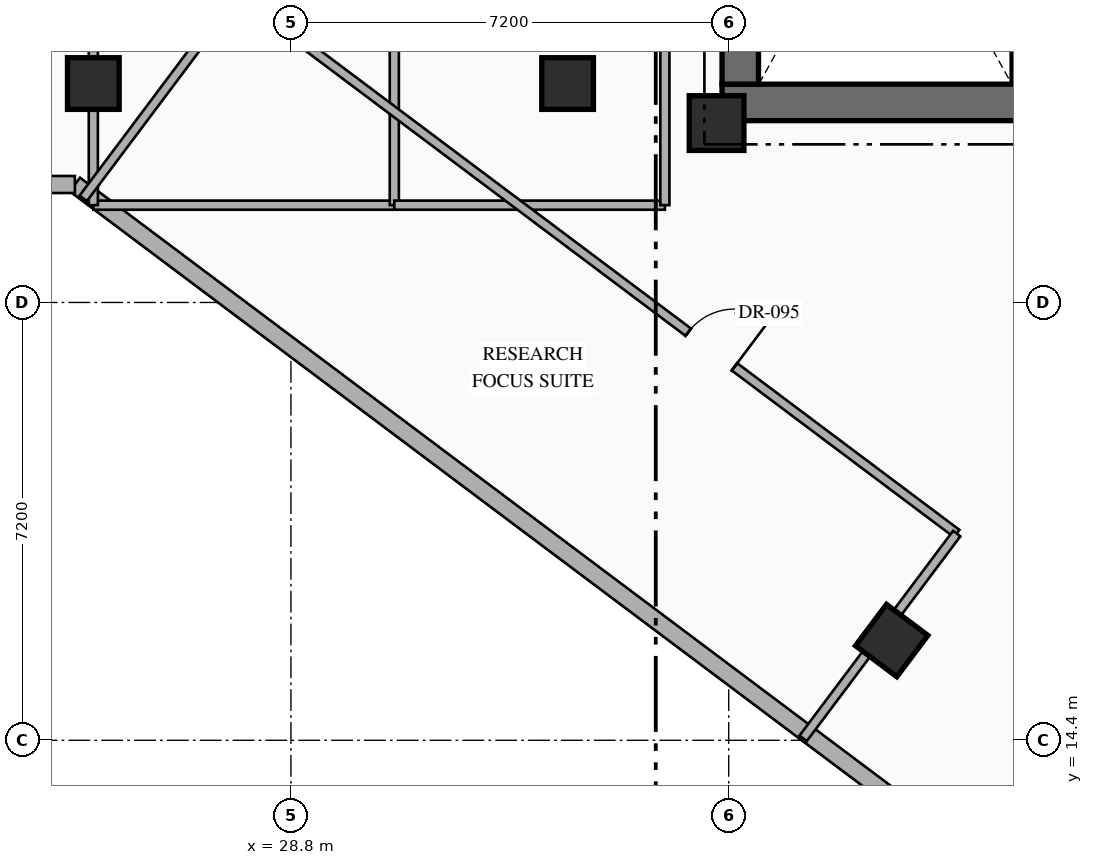
"""IFC4 building model, lengths in metres.
Left out: names, types, materials, properties, quantities, classifications, styles, units other than length and angle.
Written with IfcOpenShell. Run it as: python <this file> out.ifc"""

import sys

from ifc_helpers import new_model, si_unit, direction, frame, frame_2d, origin, origin_2d, place, context, subcontext, project, spatial, rectangle, hollow_rectangle, extrude, element, fill, save


model = new_model("IFC4")
c1 = context("Model", 3, precision=1e-05, world=origin(), true_north=direction((0.0, 1.0)))
c2 = subcontext(c1, "Body", "Model", "MODEL_VIEW")
j1 = project(units=[si_unit("LENGTHUNIT", "METRE"), si_unit("PLANEANGLEUNIT", "RADIAN")], contexts=[c1])
p1 = place(None, origin())
s1 = spatial("IfcSite", under=j1, at=p1, CompositionType="ELEMENT")
p2 = place(p1, origin())
s2 = spatial("IfcBuilding", under=s1, at=p2, CompositionType="ELEMENT")
p3 = place(p2, frame((0.0, 0.0, 138.45)))
s3 = spatial("IfcBuildingStorey", under=s2, at=p3, CompositionType="ELEMENT", Elevation=138.45)
p4 = place(p3, frame((35.89, 24.89, 0.0), z_axis=(0.0, 0.0, 1.0), x_axis=(1.0, 0.0, 0.0)))
e1 = element("IfcWall", 1, at=p4, inside=s3, PredefinedType="SHEAR", context=c2, shape_type="SweptSolid", body=[
    extrude(rectangle(XDim=7.76, YDim=0.6, at=frame_2d((3.88, 0.0))), origin(), (0.0, 0.0, 1.0), 3.6),
])
p5 = place(p3, frame((36.19, 25.19, 0.0), z_axis=(0.0, 0.0, 1.0), x_axis=(0.0, 1.0, 0.0)))
e2 = element("IfcWall", 2, at=p5, inside=s3, PredefinedType="SHEAR", context=c2, shape_type="SweptSolid", body=[
    extrude(rectangle(XDim=9.48, YDim=0.6, at=frame_2d((4.74, 0.0))), origin(), (0.0, 0.0, 1.0), 3.6),
])
p6 = place(p3, frame((40.81, 25.19, 0.0), z_axis=(0.0, 0.0, 1.0), x_axis=(0.0, 1.0, 0.0)))
e3 = element("IfcWall", 3, at=p6, inside=s3, PredefinedType="SHEAR", context=c2, shape_type="SweptSolid", body=[
    extrude(rectangle(XDim=9.48, YDim=0.3, at=frame_2d((4.74, 0.0))), origin(), (0.0, 0.0, 1.0), 3.6),
])
p7 = place(p3, frame((35.8, 24.55, 0.0), z_axis=(0.0, 0.0, 1.0), x_axis=(1.0, 0.0, 0.0)))
e4 = element("IfcColumn", 4, at=p7, inside=s3, PredefinedType="COLUMN", context=c2, shape_type="SweptSolid", body=[
    extrude(rectangle(XDim=0.9, YDim=0.9, at=origin_2d()), origin(), (0.0, 0.0, 1.0), 3.6),
])
for number, where, z_axis, x_axis in (
    (5, (25.55, 25.2, 0.0), (0.0, 0.0, 1.0), (1.0, 0.0, 0.0)),
    (6, (33.35, 25.2, 0.0), (0.0, 0.0, 1.0), (1.0, 0.0, 0.0)),
    (7, (38.68, 16.04, 0.0), (0.0, 0.0, 1.0), (0.8, -0.6, 0.0)),
):
    element("IfcColumn", number, at=place(p3, frame(where, z_axis=z_axis, x_axis=x_axis)), inside=s3, PredefinedType="COLUMN", context=c2, shape_type="SweptSolid", body=[
        extrude(hollow_rectangle(XDim=0.85, YDim=0.85, WallThickness=0.032, at=origin_2d()), origin(), (0.0, 0.0, 1.0), 3.6),
    ])
p8 = place(p3, frame((44.918, 8.787, 0.0), z_axis=(0.0, 0.0, 1.0), x_axis=(-0.800004765927, 0.599993645378, 0.0)))
e8 = element("IfcWall", 8, at=p8, inside=s3, PredefinedType="STANDARD", context=c2, shape_type="SweptSolid", body=[
    extrude(rectangle(XDim=24.588, YDim=0.28, at=frame_2d((12.294, 0.0))), origin(), (0.0, 0.0, 1.0), 3.35),
])
p9 = place(p3, frame((25.247, 23.54, 0.0), z_axis=(0.0, 0.0, 1.0), x_axis=(-1.0, 0.0, 0.0)))
e9 = element("IfcWall", 9, at=p9, inside=s3, PredefinedType="STANDARD", context=c2, shape_type="SweptSolid", body=[
    extrude(rectangle(XDim=6.747, YDim=0.28, at=frame_2d((3.374, 0.0))), origin(), (0.0, 0.0, 1.0), 3.35),
])
p10 = place(p3, frame((25.55, 23.2, 0.0), z_axis=(0.0, 0.0, 1.0), x_axis=(1.0, 0.0, 0.0)))
e10 = element("IfcWall", 10, at=p10, inside=s3, PredefinedType="PARTITIONING", context=c2, shape_type="SweptSolid", body=[
    extrude(rectangle(XDim=4.95, YDim=0.15, at=frame_2d((2.475, 0.0))), origin(), (0.0, 0.0, 1.0), 3.35),
])
p11 = place(p3, frame((25.55, 23.2, 0.0), z_axis=(0.0, 0.0, 1.0), x_axis=(0.0, 1.0, 0.0)))
e11 = element("IfcWall", 11, at=p11, inside=s3, PredefinedType="PARTITIONING", context=c2, shape_type="SweptSolid", body=[
    extrude(rectangle(XDim=7.15, YDim=0.15, at=frame_2d((3.575, 0.0))), origin(), (0.0, 0.0, 1.0), 2.695),
])
p12 = place(p3, frame((30.5, 23.2, 0.0), z_axis=(0.0, 0.0, 1.0), x_axis=(0.0, 1.0, 0.0)))
e12 = element("IfcWall", 12, at=p12, inside=s3, PredefinedType="PARTITIONING", context=c2, shape_type="SweptSolid", body=[
    extrude(rectangle(XDim=7.15, YDim=0.15, at=frame_2d((3.575, 0.0))), origin(), (0.0, 0.0, 1.0), 3.35),
])
p13 = place(p3, frame((30.5, 23.2, 0.0), z_axis=(0.0, 0.0, 1.0), x_axis=(1.0, 0.0, 0.0)))
e13 = element("IfcWall", 13, at=p13, inside=s3, PredefinedType="PARTITIONING", context=c2, shape_type="SweptSolid", body=[
    extrude(rectangle(XDim=4.45, YDim=0.15, at=frame_2d((2.225, 0.0))), origin(), (0.0, 0.0, 1.0), 3.35),
])
p14 = place(p3, frame((34.95, 23.2, 0.0), z_axis=(0.0, 0.0, 1.0), x_axis=(0.0, 1.0, 0.0)))
e14 = element("IfcWall", 14, at=p14, inside=s3, PredefinedType="PARTITIONING", context=c2, shape_type="SweptSolid", body=[
    extrude(rectangle(XDim=7.15, YDim=0.15, at=frame_2d((3.575, 0.0))), origin(), (0.0, 0.0, 1.0), 3.35),
])
p15 = place(p3, frame((27.91, 26.68, 0.0), z_axis=(0.0, 0.0, 1.0), x_axis=(0.800005938517, -0.599992081896, 0.0)))
e15 = element("IfcWall", 15, at=p15, inside=s3, PredefinedType="PARTITIONING", context=c2, shape_type="SweptSolid", body=[
    extrude(rectangle(XDim=14.8, YDim=0.15, at=frame_2d((7.4, 0.0))), origin(), (0.0, 0.0, 1.0), 3.35),
])
p16 = place(p15, frame((9.281, 0.0, 0.0)))
e16 = element("IfcOpeningElement", 16, at=p16, cuts=e15, PredefinedType="OPENING", context=c2, shape_type="SweptSolid", body=[
    extrude(rectangle(XDim=0.95, YDim=2.15, at=frame_2d((0.475, 1.075))), frame((0.0, 0.085, 0.0), z_axis=(0.0, -1.0, 0.0), x_axis=(1.0, 0.0, 0.0)), (0.0, 0.0, 1.0), 0.17),
])
p17 = place(p3, frame((25.384, 23.312, 0.0), z_axis=(0.0, 0.0, 1.0), x_axis=(0.599990721155, 0.80000695905, 0.0)))
e17 = element("IfcWall", 17, at=p17, inside=s3, PredefinedType="PARTITIONING", context=c2, shape_type="SweptSolid", body=[
    extrude(rectangle(XDim=4.21, YDim=0.15, at=frame_2d((2.105, 0.0))), origin(), (0.0, 0.0, 1.0), 3.35),
])
p18 = place(p3, frame((37.224, 14.432, 0.0), z_axis=(0.0, 0.0, 1.0), x_axis=(0.599962885857, 0.800027834262, 0.0)))
e18 = element("IfcWall", 18, at=p18, inside=s3, PredefinedType="PARTITIONING", context=c2, shape_type="SweptSolid", body=[
    extrude(rectangle(XDim=4.21, YDim=0.15, at=frame_2d((2.105, 0.0))), origin(), (0.0, 0.0, 1.0), 2.695),
])
p19 = place(p16, origin())
e19 = element("IfcDoor", 19, at=p19, inside=s3, OperationType="SINGLE_SWING_RIGHT", PredefinedType="DOOR", context=c2, shape_type="SweptSolid", body=[
    extrude(rectangle(XDim=0.95, YDim=2.15, at=frame_2d((0.475, 1.075))), frame((0.0, 0.025, 0.0), z_axis=(0.0, -1.0, 0.0), x_axis=(1.0, 0.0, 0.0)), (0.0, 0.0, 1.0), 0.05),
])
fill(e16, e19)
save(model, sys.argv[1])
